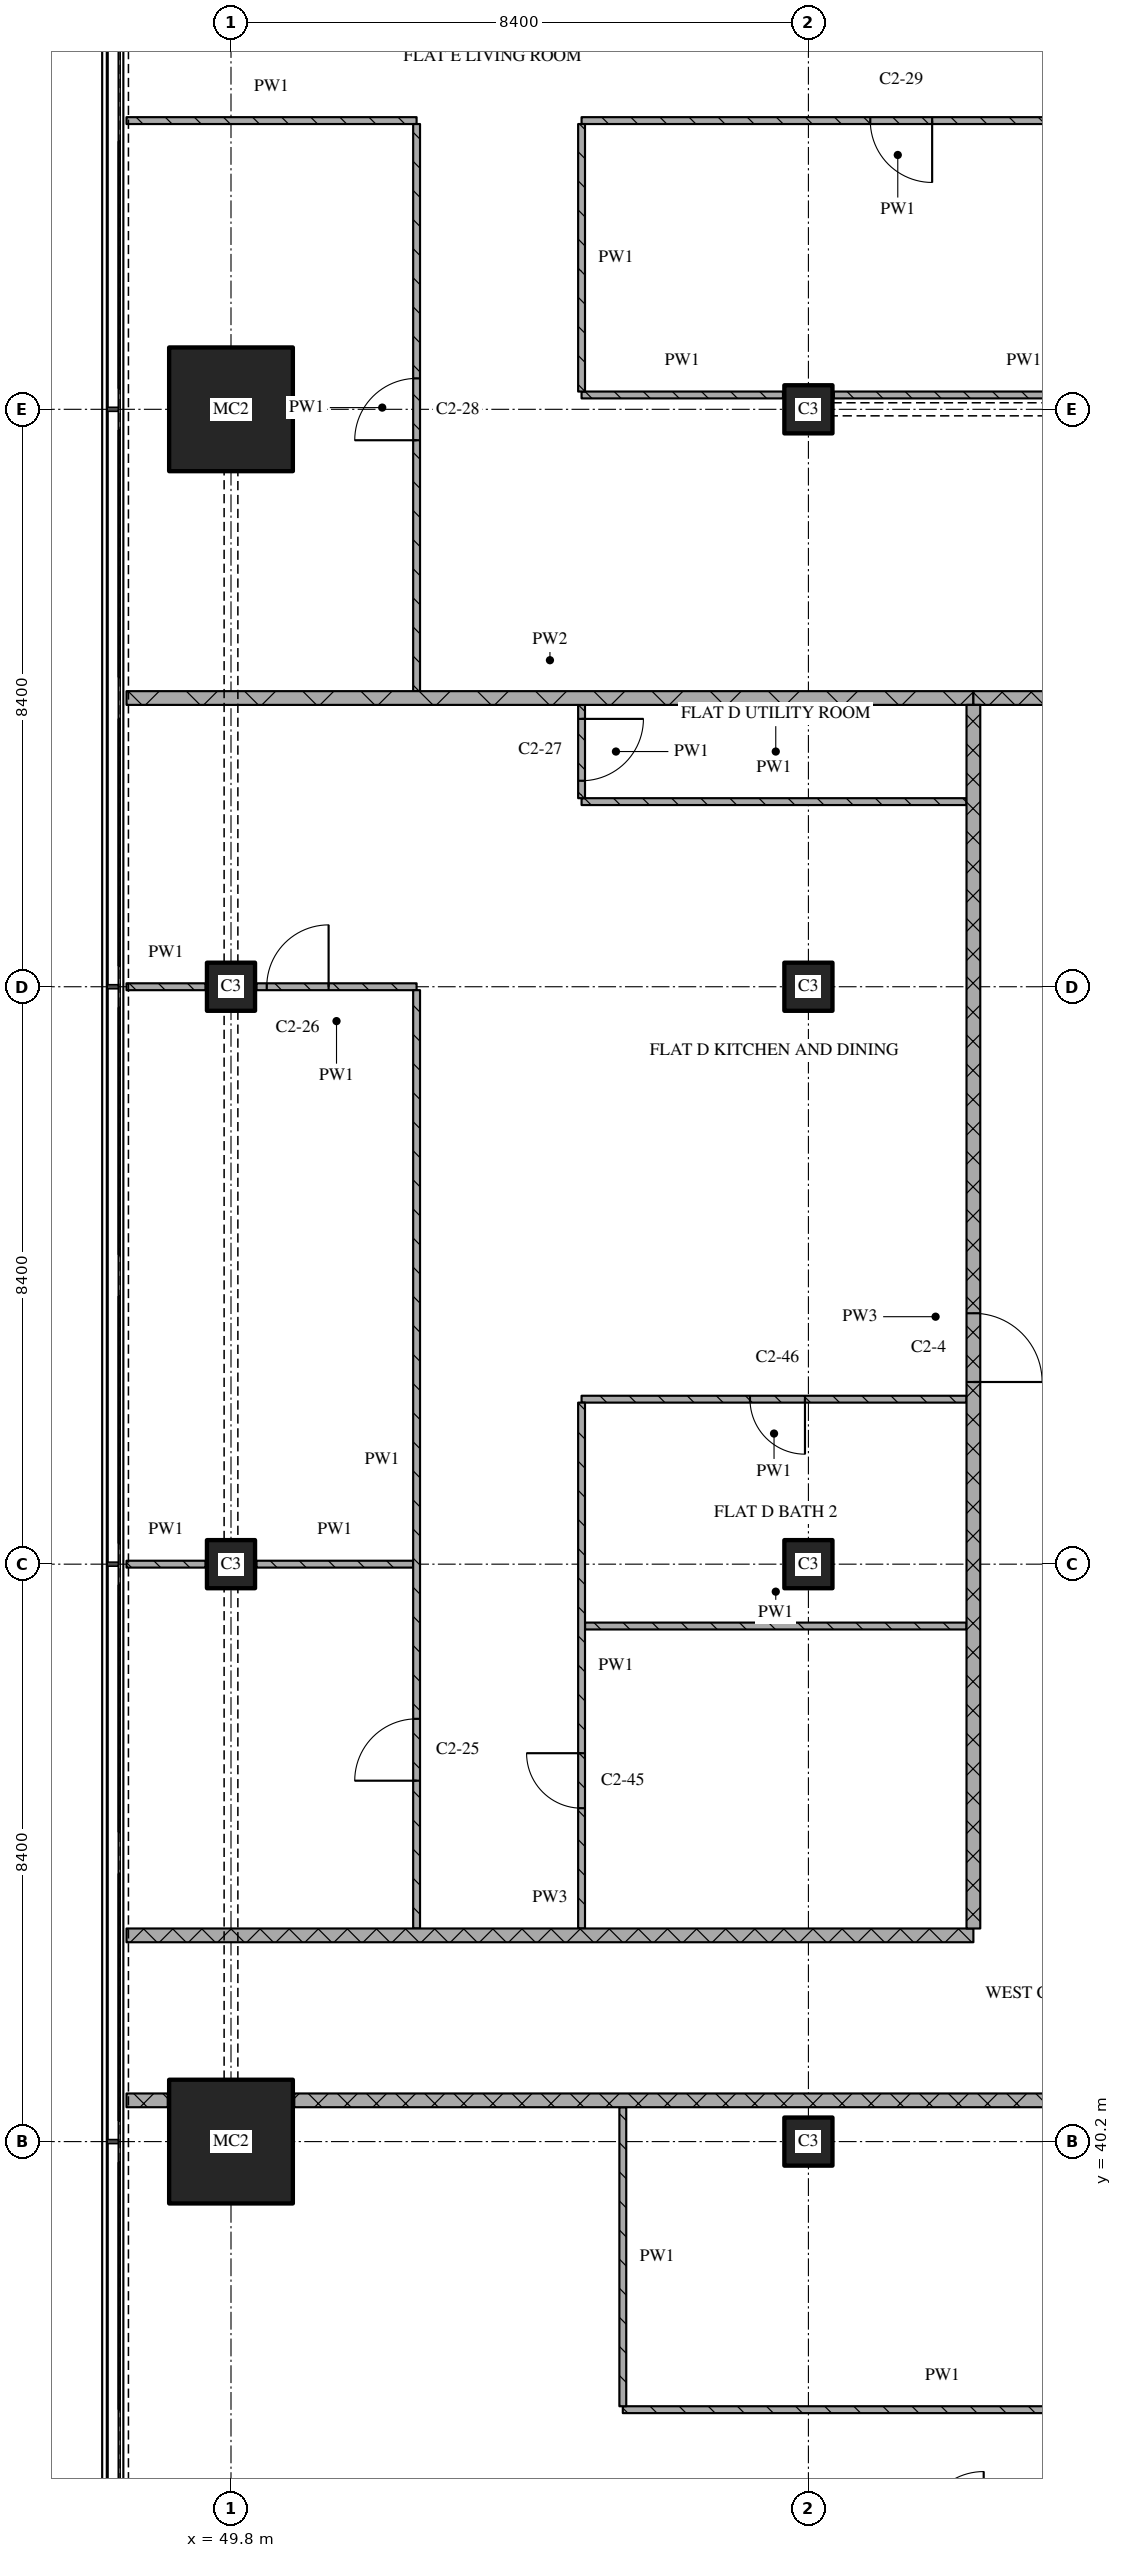
"""IFC4 building model, lengths in metres.
Left out: names, types, materials, properties, quantities, classifications, styles, units other than length and angle.
Written with IfcOpenShell. Run it as: python <this file> out.ifc"""

import sys

from ifc_helpers import new_model, si_unit, direction, frame, frame_2d, origin, origin_2d, place, context, subcontext, project, spatial, rectangle, extrude, element, fill, save


model = new_model("IFC4")
c1 = context("Model", 3, precision=1e-05, world=origin(), true_north=direction((0.0, 1.0)))
c2 = subcontext(c1, "Body", "Model", "MODEL_VIEW")
j1 = project(units=[si_unit("LENGTHUNIT", "METRE"), si_unit("PLANEANGLEUNIT", "RADIAN")], contexts=[c1])
p1 = place(None, origin())
s1 = spatial("IfcSite", under=j1, at=p1, CompositionType="ELEMENT")
p2 = place(p1, origin())
s2 = spatial("IfcBuilding", under=s1, at=p2, CompositionType="ELEMENT")
p3 = place(p2, frame((0.0, 0.0, 161.85)))
s3 = spatial("IfcBuildingStorey", under=s2, at=p3, CompositionType="ELEMENT", Elevation=161.85)
p4 = place(p3, frame((49.8, 40.2, 0.0), z_axis=(0.0, 0.0, 1.0), x_axis=(1.0, 0.0, 0.0)))
e1 = element("IfcColumn", 1, at=p4, inside=s3, PredefinedType="COLUMN", context=c2, shape_type="SweptSolid", body=[
    extrude(rectangle(XDim=1.8, YDim=1.8, at=origin_2d()), origin(), (0.0, 0.0, 1.0), 3.6),
])
for number, where, z_axis, x_axis in (
    (2, (49.8, 48.6, 0.0), (0.0, 0.0, 1.0), (1.0, 0.0, 0.0)),
    (3, (49.8, 57.0, 0.0), (0.0, 0.0, 1.0), (1.0, 0.0, 0.0)),
):
    element("IfcColumn", number, at=place(p3, frame(where, z_axis=z_axis, x_axis=x_axis)), inside=s3, PredefinedType="COLUMN", context=c2, shape_type="SweptSolid", body=[
        extrude(rectangle(XDim=0.7, YDim=0.7, at=origin_2d()), origin(), (0.0, 0.0, 1.0), 3.6),
    ])
p5 = place(p3, frame((49.8, 65.4, 0.0), z_axis=(0.0, 0.0, 1.0), x_axis=(1.0, 0.0, 0.0)))
e4 = element("IfcColumn", 4, at=p5, inside=s3, PredefinedType="COLUMN", context=c2, shape_type="SweptSolid", body=[
    extrude(rectangle(XDim=1.8, YDim=1.8, at=origin_2d()), origin(), (0.0, 0.0, 1.0), 3.6),
])
for number, where, z_axis, x_axis in (
    (5, (58.2, 40.2, 0.0), (0.0, 0.0, 1.0), (1.0, 0.0, 0.0)),
    (6, (58.2, 48.6, 0.0), (0.0, 0.0, 1.0), (1.0, 0.0, 0.0)),
    (7, (58.2, 57.0, 0.0), (0.0, 0.0, 1.0), (1.0, 0.0, 0.0)),
    (8, (58.2, 65.4, 0.0), (0.0, 0.0, 1.0), (1.0, 0.0, 0.0)),
):
    element("IfcColumn", number, at=place(p3, frame(where, z_axis=z_axis, x_axis=x_axis)), inside=s3, PredefinedType="COLUMN", context=c2, shape_type="SweptSolid", body=[
        extrude(rectangle(XDim=0.7, YDim=0.7, at=origin_2d()), origin(), (0.0, 0.0, 1.0), 3.6),
    ])
p6 = place(p3, frame((55.5, 36.3, 0.0), z_axis=(0.0, 0.0, 1.0), x_axis=(1.0, 0.0, 0.0)))
e9 = element("IfcWall", 9, at=p6, inside=s3, PredefinedType="PARTITIONING", context=c2, shape_type="SweptSolid", body=[
    extrude(rectangle(XDim=9.3, YDim=0.1, at=frame_2d((4.65, 0.0))), origin(), (0.0, 0.0, 1.0), 3.32),
])
p7 = place(p3, frame((48.28, 40.8, 0.0), z_axis=(0.0, 0.0, 1.0), x_axis=(1.0, 0.0, 0.0)))
e10 = element("IfcWall", 10, at=p7, inside=s3, PredefinedType="PARTITIONING", context=c2, shape_type="SweptSolid", body=[
    extrude(rectangle(XDim=0.6, YDim=0.2, at=frame_2d((0.3, 0.0))), origin(), (0.0, 0.0, 1.0), 3.32),
])
p8 = place(p3, frame((75.0, 40.8, 0.0), z_axis=(0.0, 0.0, 1.0), x_axis=(-1.0, 0.0, 0.0)))
e11 = element("IfcWall", 11, at=p8, inside=s3, PredefinedType="PARTITIONING", context=c2, shape_type="SweptSolid", body=[
    extrude(rectangle(XDim=24.28, YDim=0.2, at=frame_2d((12.14, 0.0))), origin(), (0.0, 0.0, 1.0), 3.32),
])
p9 = place(p8, frame((8.95, 0.0, 0.0)))
e12 = element("IfcOpeningElement", 12, at=p9, cuts=e11, PredefinedType="OPENING", context=c2, shape_type="SweptSolid", body=[
    extrude(rectangle(XDim=1.0, YDim=2.1, at=frame_2d((0.5, 1.05))), frame((0.0, 0.11, 0.0), z_axis=(0.0, -1.0, 0.0), x_axis=(1.0, 0.0, 0.0)), (0.0, 0.0, 1.0), 0.22),
])
p10 = place(p3, frame((48.28, 43.2, 0.0), z_axis=(0.0, 0.0, 1.0), x_axis=(1.0, 0.0, 0.0)))
e13 = element("IfcWall", 13, at=p10, inside=s3, PredefinedType="PARTITIONING", context=c2, shape_type="SweptSolid", body=[
    extrude(rectangle(XDim=12.32, YDim=0.2, at=frame_2d((6.16, 0.0))), origin(), (0.0, 0.0, 1.0), 3.32),
])
p11 = place(p3, frame((54.95, 47.7, 0.0), z_axis=(0.0, 0.0, 1.0), x_axis=(1.0, 0.0, 0.0)))
e14 = element("IfcWall", 14, at=p11, inside=s3, PredefinedType="PARTITIONING", context=c2, shape_type="SweptSolid", body=[
    extrude(rectangle(XDim=5.55, YDim=0.1, at=frame_2d((2.775, 0.0))), origin(), (0.0, 0.0, 1.0), 3.32),
])
p12 = place(p3, frame((48.28, 48.6, 0.0), z_axis=(0.0, 0.0, 1.0), x_axis=(1.0, 0.0, 0.0)))
e15 = element("IfcWall", 15, at=p12, inside=s3, PredefinedType="PARTITIONING", context=c2, shape_type="SweptSolid", body=[
    extrude(rectangle(XDim=1.15, YDim=0.1, at=frame_2d((0.575, 0.0))), origin(), (0.0, 0.0, 1.0), 3.32),
])
p13 = place(p3, frame((50.17, 48.6, 0.0), z_axis=(0.0, 0.0, 1.0), x_axis=(1.0, 0.0, 0.0)))
e16 = element("IfcWall", 16, at=p13, inside=s3, PredefinedType="PARTITIONING", context=c2, shape_type="SweptSolid", body=[
    extrude(rectangle(XDim=2.28, YDim=0.1, at=frame_2d((1.14, 0.0))), origin(), (0.0, 0.0, 1.0), 3.32),
])
p14 = place(p3, frame((60.5, 51.0, 0.0), z_axis=(0.0, 0.0, 1.0), x_axis=(-1.0, 0.0, 0.0)))
e17 = element("IfcWall", 17, at=p14, inside=s3, PredefinedType="PARTITIONING", context=c2, shape_type="SweptSolid", body=[
    extrude(rectangle(XDim=5.6, YDim=0.1, at=frame_2d((2.8, 0.0))), origin(), (0.0, 0.0, 1.0), 3.32),
])
p15 = place(p14, frame((2.35, 0.0, 0.0)))
e18 = element("IfcOpeningElement", 18, at=p15, cuts=e17, PredefinedType="OPENING", context=c2, shape_type="SweptSolid", body=[
    extrude(rectangle(XDim=0.8, YDim=2.1, at=frame_2d((0.4, 1.05))), frame((0.0, 0.06, 0.0), z_axis=(0.0, -1.0, 0.0), x_axis=(1.0, 0.0, 0.0)), (0.0, 0.0, 1.0), 0.12),
])
p16 = place(p3, frame((48.28, 57.0, 0.0), z_axis=(0.0, 0.0, 1.0), x_axis=(1.0, 0.0, 0.0)))
e19 = element("IfcWall", 19, at=p16, inside=s3, PredefinedType="PARTITIONING", context=c2, shape_type="SweptSolid", body=[
    extrude(rectangle(XDim=1.15, YDim=0.1, at=frame_2d((0.575, 0.0))), origin(), (0.0, 0.0, 1.0), 3.32),
])
p17 = place(p3, frame((52.5, 57.0, 0.0), z_axis=(0.0, 0.0, 1.0), x_axis=(-1.0, 0.0, 0.0)))
e20 = element("IfcWall", 20, at=p17, inside=s3, PredefinedType="PARTITIONING", context=c2, shape_type="SweptSolid", body=[
    extrude(rectangle(XDim=2.33, YDim=0.1, at=frame_2d((1.165, 0.0))), origin(), (0.0, 0.0, 1.0), 3.32),
])
p18 = place(p17, frame((1.28, 0.0, 0.0)))
e21 = element("IfcOpeningElement", 21, at=p18, cuts=e20, PredefinedType="OPENING", context=c2, shape_type="SweptSolid", body=[
    extrude(rectangle(XDim=0.9, YDim=2.1, at=frame_2d((0.45, 1.05))), frame((0.0, 0.06, 0.0), z_axis=(0.0, -1.0, 0.0), x_axis=(1.0, 0.0, 0.0)), (0.0, 0.0, 1.0), 0.12),
])
p19 = place(p3, frame((54.9, 59.693, 0.0), z_axis=(0.0, 0.0, 1.0), x_axis=(1.0, 0.0, 0.0)))
e22 = element("IfcWall", 22, at=p19, inside=s3, PredefinedType="PARTITIONING", context=c2, shape_type="SweptSolid", body=[
    extrude(rectangle(XDim=5.6, YDim=0.1, at=frame_2d((2.8, 0.0))), origin(), (0.0, 0.0, 1.0), 3.32),
])
p20 = place(p3, frame((60.6, 61.2, 0.0), z_axis=(0.0, 0.0, 1.0), x_axis=(1.0, 0.0, 0.0)))
e23 = element("IfcWall", 23, at=p20, inside=s3, PredefinedType="PARTITIONING", context=c2, shape_type="SweptSolid", body=[
    extrude(rectangle(XDim=3.6, YDim=0.2, at=frame_2d((1.8, 0.0))), origin(), (0.0, 0.0, 1.0), 3.32),
])
p21 = place(p3, frame((48.28, 61.2, 0.0), z_axis=(0.0, 0.0, 1.0), x_axis=(1.0, 0.0, 0.0)))
e24 = element("IfcWall", 24, at=p21, inside=s3, PredefinedType="PARTITIONING", context=c2, shape_type="SweptSolid", body=[
    extrude(rectangle(XDim=12.32, YDim=0.2, at=frame_2d((6.16, 0.0))), origin(), (0.0, 0.0, 1.0), 3.32),
])
p22 = place(p3, frame((54.9, 65.609, 0.0), z_axis=(0.0, 0.0, 1.0), x_axis=(1.0, 0.0, 0.0)))
e25 = element("IfcWall", 25, at=p22, inside=s3, PredefinedType="PARTITIONING", context=c2, shape_type="SweptSolid", body=[
    extrude(rectangle(XDim=2.93, YDim=0.1, at=frame_2d((1.465, 0.0))), origin(), (0.0, 0.0, 1.0), 3.32),
])
p23 = place(p3, frame((58.57, 65.609, 0.0), z_axis=(0.0, 0.0, 1.0), x_axis=(1.0, 0.0, 0.0)))
e26 = element("IfcWall", 26, at=p23, inside=s3, PredefinedType="PARTITIONING", context=c2, shape_type="SweptSolid", body=[
    extrude(rectangle(XDim=5.53, YDim=0.1, at=frame_2d((2.765, 0.0))), origin(), (0.0, 0.0, 1.0), 3.32),
])
p24 = place(p3, frame((48.28, 69.6, 0.0), z_axis=(0.0, 0.0, 1.0), x_axis=(1.0, 0.0, 0.0)))
e27 = element("IfcWall", 27, at=p24, inside=s3, PredefinedType="PARTITIONING", context=c2, shape_type="SweptSolid", body=[
    extrude(rectangle(XDim=4.22, YDim=0.1, at=frame_2d((2.11, 0.0))), origin(), (0.0, 0.0, 1.0), 3.32),
])
p25 = place(p3, frame((64.1, 69.6, 0.0), z_axis=(0.0, 0.0, 1.0), x_axis=(-1.0, 0.0, 0.0)))
e28 = element("IfcWall", 28, at=p25, inside=s3, PredefinedType="PARTITIONING", context=c2, shape_type="SweptSolid", body=[
    extrude(rectangle(XDim=9.2, YDim=0.1, at=frame_2d((4.6, 0.0))), origin(), (0.0, 0.0, 1.0), 3.32),
])
p26 = place(p25, frame((4.1, 0.0, 0.0)))
e29 = element("IfcOpeningElement", 29, at=p26, cuts=e28, PredefinedType="OPENING", context=c2, shape_type="SweptSolid", body=[
    extrude(rectangle(XDim=0.9, YDim=2.1, at=frame_2d((0.45, 1.05))), frame((0.0, 0.06, 0.0), z_axis=(0.0, -1.0, 0.0), x_axis=(1.0, 0.0, 0.0)), (0.0, 0.0, 1.0), 0.12),
])
p27 = place(p3, frame((52.5, 43.3, 0.0), z_axis=(0.0, 0.0, 1.0), x_axis=(0.0, 1.0, 0.0)))
e30 = element("IfcWall", 30, at=p27, inside=s3, PredefinedType="PARTITIONING", context=c2, shape_type="SweptSolid", body=[
    extrude(rectangle(XDim=13.65, YDim=0.1, at=frame_2d((6.825, 0.0))), origin(), (0.0, 0.0, 1.0), 3.32),
])
p28 = place(p27, frame((2.15, 0.0, 0.0)))
e31 = element("IfcOpeningElement", 31, at=p28, cuts=e30, PredefinedType="OPENING", context=c2, shape_type="SweptSolid", body=[
    extrude(rectangle(XDim=0.9, YDim=2.1, at=frame_2d((0.45, 1.05))), frame((0.0, 0.06, 0.0), z_axis=(0.0, -1.0, 0.0), x_axis=(1.0, 0.0, 0.0)), (0.0, 0.0, 1.0), 0.12),
])
p29 = place(p3, frame((52.5, 61.3, 0.0), z_axis=(0.0, 0.0, 1.0), x_axis=(0.0, 1.0, 0.0)))
e32 = element("IfcWall", 32, at=p29, inside=s3, PredefinedType="PARTITIONING", context=c2, shape_type="SweptSolid", body=[
    extrude(rectangle(XDim=8.25, YDim=0.1, at=frame_2d((4.125, 0.0))), origin(), (0.0, 0.0, 1.0), 3.32),
])
p30 = place(p29, frame((3.65, 0.0, 0.0)))
e33 = element("IfcOpeningElement", 33, at=p30, cuts=e32, PredefinedType="OPENING", context=c2, shape_type="SweptSolid", body=[
    extrude(rectangle(XDim=0.9, YDim=2.1, at=frame_2d((0.45, 1.05))), frame((0.0, 0.06, 0.0), z_axis=(0.0, -1.0, 0.0), x_axis=(1.0, 0.0, 0.0)), (0.0, 0.0, 1.0), 0.12),
])
p31 = place(p3, frame((54.9, 50.95, 0.0), z_axis=(0.0, 0.0, 1.0), x_axis=(0.0, -1.0, 0.0)))
e34 = element("IfcWall", 34, at=p31, inside=s3, PredefinedType="PARTITIONING", context=c2, shape_type="SweptSolid", body=[
    extrude(rectangle(XDim=7.65, YDim=0.1, at=frame_2d((3.825, 0.0))), origin(), (0.0, 0.0, 1.0), 3.32),
])
p32 = place(p31, frame((5.1, 0.0, 0.0)))
e35 = element("IfcOpeningElement", 35, at=p32, cuts=e34, PredefinedType="OPENING", context=c2, shape_type="SweptSolid", body=[
    extrude(rectangle(XDim=0.8, YDim=2.1, at=frame_2d((0.4, 1.05))), frame((0.0, 0.06, 0.0), z_axis=(0.0, -1.0, 0.0), x_axis=(1.0, 0.0, 0.0)), (0.0, 0.0, 1.0), 0.12),
])
p33 = place(p3, frame((54.9, 61.1, 0.0), z_axis=(0.0, 0.0, 1.0), x_axis=(0.0, -1.0, 0.0)))
e36 = element("IfcWall", 36, at=p33, inside=s3, PredefinedType="PARTITIONING", context=c2, shape_type="SweptSolid", body=[
    extrude(rectangle(XDim=1.357, YDim=0.1, at=frame_2d((0.679, 0.0))), origin(), (0.0, 0.0, 1.0), 3.32),
])
p34 = place(p33, frame((0.204, 0.0, 0.0)))
e37 = element("IfcOpeningElement", 37, at=p34, cuts=e36, PredefinedType="OPENING", context=c2, shape_type="SweptSolid", body=[
    extrude(rectangle(XDim=0.9, YDim=2.1, at=frame_2d((0.45, 1.05))), frame((0.0, 0.06, 0.0), z_axis=(0.0, -1.0, 0.0), x_axis=(1.0, 0.0, 0.0)), (0.0, 0.0, 1.0), 0.12),
])
p35 = place(p3, frame((54.9, 69.55, 0.0), z_axis=(0.0, 0.0, 1.0), x_axis=(0.0, -1.0, 0.0)))
e38 = element("IfcWall", 38, at=p35, inside=s3, PredefinedType="PARTITIONING", context=c2, shape_type="SweptSolid", body=[
    extrude(rectangle(XDim=3.891, YDim=0.1, at=frame_2d((1.946, 0.0))), origin(), (0.0, 0.0, 1.0), 3.32),
])
p36 = place(p3, frame((55.5, 40.7, 0.0), z_axis=(0.0, 0.0, 1.0), x_axis=(0.0, -1.0, 0.0)))
e39 = element("IfcWall", 39, at=p36, inside=s3, PredefinedType="PARTITIONING", context=c2, shape_type="SweptSolid", body=[
    extrude(rectangle(XDim=4.35, YDim=0.1, at=frame_2d((2.175, 0.0))), origin(), (0.0, 0.0, 1.0), 3.32),
])
p37 = place(p3, frame((60.6, 43.3, 0.0), z_axis=(0.0, 0.0, 1.0), x_axis=(0.0, 1.0, 0.0)))
e40 = element("IfcWall", 40, at=p37, inside=s3, PredefinedType="PARTITIONING", context=c2, shape_type="SweptSolid", body=[
    extrude(rectangle(XDim=17.8, YDim=0.2, at=frame_2d((8.9, 0.0))), origin(), (0.0, 0.0, 1.0), 3.32),
])
p38 = place(p37, frame((7.95, 0.0, 0.0)))
e41 = element("IfcOpeningElement", 41, at=p38, cuts=e40, PredefinedType="OPENING", context=c2, shape_type="SweptSolid", body=[
    extrude(rectangle(XDim=1.0, YDim=2.1, at=frame_2d((0.5, 1.05))), frame((0.0, 0.11, 0.0), z_axis=(0.0, -1.0, 0.0), x_axis=(1.0, 0.0, 0.0)), (0.0, 0.0, 1.0), 0.22),
])
p39 = place(p15, origin())
e42 = element("IfcDoor", 42, at=p39, inside=s3, OperationType="SINGLE_SWING_LEFT", PredefinedType="DOOR", context=c2, shape_type="SweptSolid", body=[
    extrude(rectangle(XDim=0.8, YDim=2.1, at=frame_2d((0.4, 1.05))), frame((0.0, 0.025, 0.0), z_axis=(0.0, -1.0, 0.0), x_axis=(1.0, 0.0, 0.0)), (0.0, 0.0, 1.0), 0.05),
])
fill(e18, e42)
p40 = place(p18, origin())
e43 = element("IfcDoor", 43, at=p40, inside=s3, OperationType="SINGLE_SWING_RIGHT", PredefinedType="DOOR", context=c2, shape_type="SweptSolid", body=[
    extrude(rectangle(XDim=0.9, YDim=2.1, at=frame_2d((0.45, 1.05))), frame((0.0, 0.025, 0.0), z_axis=(0.0, -1.0, 0.0), x_axis=(1.0, 0.0, 0.0)), (0.0, 0.0, 1.0), 0.05),
])
fill(e21, e43)
p41 = place(p26, origin())
e44 = element("IfcDoor", 44, at=p41, inside=s3, OperationType="SINGLE_SWING_LEFT", PredefinedType="DOOR", context=c2, shape_type="SweptSolid", body=[
    extrude(rectangle(XDim=0.9, YDim=2.1, at=frame_2d((0.45, 1.05))), frame((0.0, 0.025, 0.0), z_axis=(0.0, -1.0, 0.0), x_axis=(1.0, 0.0, 0.0)), (0.0, 0.0, 1.0), 0.05),
])
fill(e29, e44)
p42 = place(p28, origin())
e45 = element("IfcDoor", 45, at=p42, inside=s3, OperationType="SINGLE_SWING_LEFT", PredefinedType="DOOR", context=c2, shape_type="SweptSolid", body=[
    extrude(rectangle(XDim=0.9, YDim=2.1, at=frame_2d((0.45, 1.05))), frame((0.0, 0.025, 0.0), z_axis=(0.0, -1.0, 0.0), x_axis=(1.0, 0.0, 0.0)), (0.0, 0.0, 1.0), 0.05),
])
fill(e31, e45)
p43 = place(p30, origin())
e46 = element("IfcDoor", 46, at=p43, inside=s3, OperationType="SINGLE_SWING_LEFT", PredefinedType="DOOR", context=c2, shape_type="SweptSolid", body=[
    extrude(rectangle(XDim=0.9, YDim=2.1, at=frame_2d((0.45, 1.05))), frame((0.0, 0.025, 0.0), z_axis=(0.0, -1.0, 0.0), x_axis=(1.0, 0.0, 0.0)), (0.0, 0.0, 1.0), 0.05),
])
fill(e33, e46)
p44 = place(p32, origin())
e47 = element("IfcDoor", 47, at=p44, inside=s3, OperationType="SINGLE_SWING_RIGHT", PredefinedType="DOOR", context=c2, shape_type="SweptSolid", body=[
    extrude(rectangle(XDim=0.8, YDim=2.1, at=frame_2d((0.4, 1.05))), frame((0.0, 0.025, 0.0), z_axis=(0.0, -1.0, 0.0), x_axis=(1.0, 0.0, 0.0)), (0.0, 0.0, 1.0), 0.05),
])
fill(e35, e47)
p45 = place(p34, origin())
e48 = element("IfcDoor", 48, at=p45, inside=s3, OperationType="SINGLE_SWING_LEFT", PredefinedType="DOOR", context=c2, shape_type="SweptSolid", body=[
    extrude(rectangle(XDim=0.9, YDim=2.1, at=frame_2d((0.45, 1.05))), frame((0.0, 0.025, 0.0), z_axis=(0.0, -1.0, 0.0), x_axis=(1.0, 0.0, 0.0)), (0.0, 0.0, 1.0), 0.05),
])
fill(e37, e48)
p46 = place(p38, origin())
e49 = element("IfcDoor", 49, at=p46, inside=s3, OperationType="SINGLE_SWING_RIGHT", PredefinedType="DOOR", context=c2, shape_type="SweptSolid", body=[
    extrude(rectangle(XDim=1.0, YDim=2.1, at=frame_2d((0.5, 1.05))), frame((0.0, 0.025, 0.0), z_axis=(0.0, -1.0, 0.0), x_axis=(1.0, 0.0, 0.0)), (0.0, 0.0, 1.0), 0.05),
])
fill(e41, e49)
save(model, sys.argv[1])
